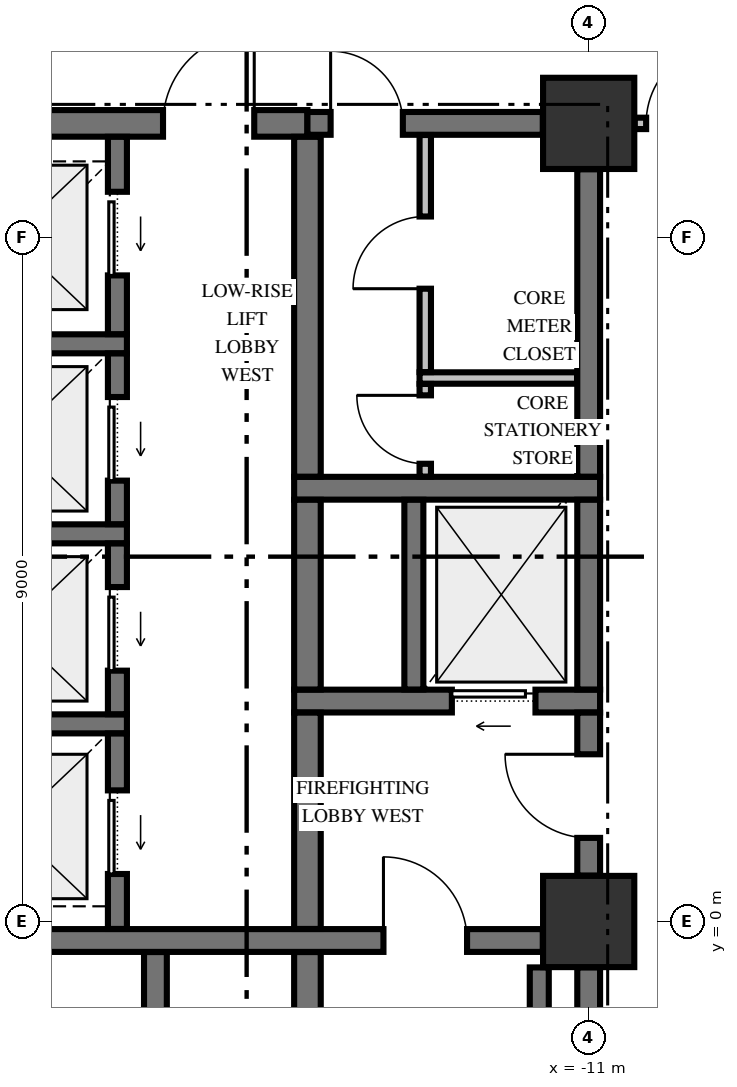
"""IFC4 building model, lengths in metres.
Left out: names, types, materials, properties, quantities, classifications, styles, units other than length and angle.
Written with IfcOpenShell. Run it as: python <this file> out.ifc"""

import sys

from ifc_helpers import new_model, si_unit, direction, frame, frame_2d, origin, origin_2d, place, context, subcontext, project, spatial, rectangle, extrude, element, fill, save


model = new_model("IFC4")
c1 = context("Model", 3, precision=1e-05, world=origin(), true_north=direction((0.0, 1.0)))
c2 = subcontext(c1, "Body", "Model", "MODEL_VIEW")
j1 = project(units=[si_unit("LENGTHUNIT", "METRE"), si_unit("PLANEANGLEUNIT", "RADIAN")], contexts=[c1])
p1 = place(None, origin())
s1 = spatial("IfcSite", under=j1, at=p1, CompositionType="ELEMENT")
p2 = place(p1, origin())
s2 = spatial("IfcBuilding", under=s1, at=p2, CompositionType="ELEMENT")
p3 = place(p2, frame((0.0, 0.0, 27.2)))
s3 = spatial("IfcBuildingStorey", under=s2, at=p3, CompositionType="ELEMENT", Elevation=27.2)
for number, where, z_axis, x_axis in (
    (1, (-11.0, 0.0, -0.45), (0.0, 0.0, 1.0), (1.0, 0.0, 0.0)),
    (2, (-11.0, 10.5, -0.45), (0.0, 0.0, 1.0), (1.0, 0.0, 0.0)),
):
    element("IfcColumn", number, at=place(p3, frame(where, z_axis=z_axis, x_axis=x_axis)), inside=s3, PredefinedType="COLUMN", context=c2, shape_type="SweptSolid", body=[
        extrude(rectangle(XDim=1.2, YDim=1.2, at=origin_2d()), origin(), (0.0, 0.0, 1.0), 3.77),
    ])
p4 = place(p3, frame((-19.396, -0.25, 0.0), z_axis=(0.0, 0.0, 1.0), x_axis=(1.0, 0.0, 0.0)))
e3 = element("IfcWall", 3, at=p4, inside=s3, PredefinedType="SHEAR", context=c2, shape_type="SweptSolid", body=[
    extrude(rectangle(XDim=7.792, YDim=0.3, at=frame_2d((3.896, 0.0))), origin(), (0.0, 0.0, 1.0), 3.32),
])
p5 = place(p4, frame((5.696, 0.0, 0.0)))
e4 = element("IfcOpeningElement", 4, at=p5, cuts=e3, PredefinedType="OPENING", context=c2, shape_type="SweptSolid", body=[
    extrude(rectangle(XDim=1.1, YDim=2.15, at=frame_2d((0.55, 1.075))), frame((0.0, 0.16, 0.0), z_axis=(0.0, -1.0, 0.0), x_axis=(1.0, 0.0, 0.0)), (0.0, 0.0, 1.0), 0.32),
])
p6 = place(p3, frame((-20.175, 2.6, 0.0), z_axis=(0.0, 0.0, 1.0), x_axis=(1.0, 0.0, 0.0)))
e5 = element("IfcWall", 5, at=p6, inside=s3, PredefinedType="SOLIDWALL", context=c2, shape_type="SweptSolid", body=[
    extrude(rectangle(XDim=3.1, YDim=0.25, at=frame_2d((1.55, 0.0))), origin(), (0.0, 0.0, 1.0), 3.32),
])
p7 = place(p3, frame((-14.875, 2.9, 0.0), z_axis=(0.0, 0.0, 1.0), x_axis=(1.0, 0.0, 0.0)))
e6 = element("IfcWall", 6, at=p7, inside=s3, PredefinedType="SHEAR", context=c2, shape_type="SweptSolid", body=[
    extrude(rectangle(XDim=4.025, YDim=0.3, at=frame_2d((2.012, 0.0))), origin(), (0.0, 0.0, 1.0), 3.32),
])
p8 = place(p7, frame((2.075, 0.0, 0.0)))
e7 = element("IfcOpeningElement", 7, at=p8, cuts=e6, PredefinedType="OPENING", context=c2, shape_type="SweptSolid", body=[
    extrude(rectangle(XDim=1.1, YDim=2.2, at=frame_2d((0.55, 1.1))), frame((0.0, 0.16, 0.0), z_axis=(0.0, -1.0, 0.0), x_axis=(1.0, 0.0, 0.0)), (0.0, 0.0, 1.0), 0.32),
])
p9 = place(p3, frame((-20.175, 5.1, 0.0), z_axis=(0.0, 0.0, 1.0), x_axis=(1.0, 0.0, 0.0)))
e8 = element("IfcWall", 8, at=p9, inside=s3, PredefinedType="SOLIDWALL", context=c2, shape_type="SweptSolid", body=[
    extrude(rectangle(XDim=3.1, YDim=0.25, at=frame_2d((1.55, 0.0))), origin(), (0.0, 0.0, 1.0), 3.32),
])
p10 = place(p3, frame((-14.875, 5.7, 0.0), z_axis=(0.0, 0.0, 1.0), x_axis=(1.0, 0.0, 0.0)))
e9 = element("IfcWall", 9, at=p10, inside=s3, PredefinedType="SHEAR", context=c2, shape_type="SweptSolid", body=[
    extrude(rectangle(XDim=4.025, YDim=0.3, at=frame_2d((2.012, 0.0))), origin(), (0.0, 0.0, 1.0), 3.32),
])
p11 = place(p3, frame((-20.175, 7.6, 0.0), z_axis=(0.0, 0.0, 1.0), x_axis=(1.0, 0.0, 0.0)))
e10 = element("IfcWall", 10, at=p11, inside=s3, PredefinedType="SOLIDWALL", context=c2, shape_type="SweptSolid", body=[
    extrude(rectangle(XDim=3.1, YDim=0.25, at=frame_2d((1.55, 0.0))), origin(), (0.0, 0.0, 1.0), 3.32),
])
p12 = place(p3, frame((-19.396, 10.5, 0.0), z_axis=(0.0, 0.0, 1.0), x_axis=(1.0, 0.0, 0.0)))
e11 = element("IfcWall", 11, at=p12, inside=s3, PredefinedType="SHEAR", context=c2, shape_type="SweptSolid", body=[
    extrude(rectangle(XDim=4.696, YDim=0.35, at=frame_2d((2.348, 0.0))), origin(), (0.0, 0.0, 1.0), 3.32),
])
p13 = place(p12, frame((2.796, 0.0, 0.0)))
e12 = element("IfcOpeningElement", 12, at=p13, cuts=e11, PredefinedType="OPENING", context=c2, shape_type="SweptSolid", body=[
    extrude(rectangle(XDim=1.2, YDim=2.15, at=frame_2d((0.6, 1.075))), frame((0.0, 0.185, 0.0), z_axis=(0.0, -1.0, 0.0), x_axis=(1.0, 0.0, 0.0)), (0.0, 0.0, 1.0), 0.37),
])
p14 = place(p3, frame((-14.7, 10.5, 0.0), z_axis=(0.0, 0.0, 1.0), x_axis=(1.0, 0.0, 0.0)))
e13 = element("IfcWall", 13, at=p14, inside=s3, PredefinedType="SHEAR", context=c2, shape_type="SweptSolid", body=[
    extrude(rectangle(XDim=3.096, YDim=0.3, at=frame_2d((1.548, 0.0))), origin(), (0.0, 0.0, 1.0), 3.32),
])
p15 = place(p14, frame((0.305, 0.0, 0.0)))
e14 = element("IfcOpeningElement", 14, at=p15, cuts=e13, PredefinedType="OPENING", context=c2, shape_type="SweptSolid", body=[
    extrude(rectangle(XDim=0.95, YDim=2.15, at=frame_2d((0.475, 1.075))), frame((0.0, 0.16, 0.0), z_axis=(0.0, -1.0, 0.0), x_axis=(1.0, 0.0, 0.0)), (0.0, 0.0, 1.0), 0.32),
])
p16 = place(p3, frame((-13.225, 7.15, 0.0), z_axis=(0.0, 0.0, 1.0), x_axis=(1.0, 0.0, 0.0)))
e15 = element("IfcWall", 15, at=p16, inside=s3, PredefinedType="PARTITIONING", context=c2, shape_type="SweptSolid", body=[
    extrude(rectangle(XDim=2.072, YDim=0.15, at=frame_2d((1.036, 0.0))), origin(), (0.0, 0.0, 1.0), 3.32),
])
p17 = place(p3, frame((-10.394, 10.5, 0.0), z_axis=(0.0, 0.0, 1.0), x_axis=(1.0, 0.0, 0.0)))
e16 = element("IfcWall", 16, at=p17, inside=s3, PredefinedType="PARTITIONING", context=c2, shape_type="SweptSolid", body=[
    extrude(rectangle(XDim=20.788, YDim=0.15, at=frame_2d((10.394, 0.0))), origin(), (0.0, 0.0, 1.0), 3.32),
])
p18 = place(p17, frame((0.15, 0.0, 0.0)))
e17 = element("IfcOpeningElement", 17, at=p18, cuts=e16, PredefinedType="OPENING", context=c2, shape_type="SweptSolid", body=[
    extrude(rectangle(XDim=1.05, YDim=2.15, at=frame_2d((0.525, 1.075))), frame((0.0, 0.085, 0.0), z_axis=(0.0, -1.0, 0.0), x_axis=(1.0, 0.0, 0.0)), (0.0, 0.0, 1.0), 0.17),
])
p19 = place(p17, frame((19.588, 0.0, 0.0)))
e18 = element("IfcOpeningElement", 18, at=p19, cuts=e16, PredefinedType="OPENING", context=c2, shape_type="SweptSolid", body=[
    extrude(rectangle(XDim=1.05, YDim=2.15, at=frame_2d((0.525, 1.075))), frame((0.0, 0.085, 0.0), z_axis=(0.0, -1.0, 0.0), x_axis=(1.0, 0.0, 0.0)), (0.0, 0.0, 1.0), 0.17),
])
p20 = place(p3, frame((-17.2, -0.098, 0.0), z_axis=(0.0, 0.0, 1.0), x_axis=(0.0, 1.0, 0.0)))
e19 = element("IfcWall", 19, at=p20, inside=s3, PredefinedType="SOLIDWALL", context=c2, shape_type="SweptSolid", body=[
    extrude(rectangle(XDim=2.571, YDim=0.25, at=frame_2d((1.285, 0.0))), origin(), (0.0, 0.0, 1.0), 3.32),
])
p21 = place(p20, frame((0.723, 0.0, 0.0)))
e20 = element("IfcOpeningElement", 20, at=p21, cuts=e19, PredefinedType="OPENING", context=c2, shape_type="SweptSolid", body=[
    extrude(rectangle(XDim=1.1, YDim=2.2, at=frame_2d((0.55, 1.1))), frame((0.0, 0.135, 0.0), z_axis=(0.0, -1.0, 0.0), x_axis=(1.0, 0.0, 0.0)), (0.0, 0.0, 1.0), 0.27),
])
p22 = place(p3, frame((-17.2, 2.727, 0.0), z_axis=(0.0, 0.0, 1.0), x_axis=(0.0, 1.0, 0.0)))
e21 = element("IfcWall", 21, at=p22, inside=s3, PredefinedType="SOLIDWALL", context=c2, shape_type="SweptSolid", body=[
    extrude(rectangle(XDim=2.246, YDim=0.25, at=frame_2d((1.123, 0.0))), origin(), (0.0, 0.0, 1.0), 3.32),
])
p23 = place(p22, frame((0.573, 0.0, 0.0)))
e22 = element("IfcOpeningElement", 22, at=p23, cuts=e21, PredefinedType="OPENING", context=c2, shape_type="SweptSolid", body=[
    extrude(rectangle(XDim=1.1, YDim=2.2, at=frame_2d((0.55, 1.1))), frame((0.0, 0.135, 0.0), z_axis=(0.0, -1.0, 0.0), x_axis=(1.0, 0.0, 0.0)), (0.0, 0.0, 1.0), 0.27),
])
p24 = place(p3, frame((-17.2, 5.227, 0.0), z_axis=(0.0, 0.0, 1.0), x_axis=(0.0, 1.0, 0.0)))
e23 = element("IfcWall", 23, at=p24, inside=s3, PredefinedType="SOLIDWALL", context=c2, shape_type="SweptSolid", body=[
    extrude(rectangle(XDim=2.246, YDim=0.25, at=frame_2d((1.123, 0.0))), origin(), (0.0, 0.0, 1.0), 3.32),
])
p25 = place(p24, frame((0.573, 0.0, 0.0)))
e24 = element("IfcOpeningElement", 24, at=p25, cuts=e23, PredefinedType="OPENING", context=c2, shape_type="SweptSolid", body=[
    extrude(rectangle(XDim=1.1, YDim=2.2, at=frame_2d((0.55, 1.1))), frame((0.0, 0.135, 0.0), z_axis=(0.0, -1.0, 0.0), x_axis=(1.0, 0.0, 0.0)), (0.0, 0.0, 1.0), 0.27),
])
p26 = place(p3, frame((-17.2, 7.727, 0.0), z_axis=(0.0, 0.0, 1.0), x_axis=(0.0, 1.0, 0.0)))
e25 = element("IfcWall", 25, at=p26, inside=s3, PredefinedType="SOLIDWALL", context=c2, shape_type="SweptSolid", body=[
    extrude(rectangle(XDim=2.596, YDim=0.25, at=frame_2d((1.298, 0.0))), origin(), (0.0, 0.0, 1.0), 3.32),
])
p27 = place(p26, frame((0.773, 0.0, 0.0)))
e26 = element("IfcOpeningElement", 26, at=p27, cuts=e25, PredefinedType="OPENING", context=c2, shape_type="SweptSolid", body=[
    extrude(rectangle(XDim=1.1, YDim=2.2, at=frame_2d((0.55, 1.1))), frame((0.0, 0.135, 0.0), z_axis=(0.0, -1.0, 0.0), x_axis=(1.0, 0.0, 0.0)), (0.0, 0.0, 1.0), 0.27),
])
p28 = place(p3, frame((-16.7, -9.773, 0.0), z_axis=(0.0, 0.0, 1.0), x_axis=(0.0, 1.0, 0.0)))
e27 = element("IfcWall", 27, at=p28, inside=s3, PredefinedType="SHEAR", context=c2, shape_type="SweptSolid", body=[
    extrude(rectangle(XDim=9.371, YDim=0.3, at=frame_2d((4.686, 0.0))), origin(), (0.0, 0.0, 1.0), 3.32),
])
p29 = place(p3, frame((-14.7, -9.773, 0.0), z_axis=(0.0, 0.0, 1.0), x_axis=(0.0, 1.0, 0.0)))
e28 = element("IfcWall", 28, at=p29, inside=s3, PredefinedType="SHEAR", context=c2, shape_type="SweptSolid", body=[
    extrude(rectangle(XDim=9.371, YDim=0.35, at=frame_2d((4.686, 0.0))), origin(), (0.0, 0.0, 1.0), 3.32),
])
p30 = place(p3, frame((-14.7, -0.098, 0.0), z_axis=(0.0, 0.0, 1.0), x_axis=(0.0, 1.0, 0.0)))
e29 = element("IfcWall", 29, at=p30, inside=s3, PredefinedType="SHEAR", context=c2, shape_type="SweptSolid", body=[
    extrude(rectangle(XDim=2.846, YDim=0.35, at=frame_2d((1.423, 0.0))), origin(), (0.0, 0.0, 1.0), 3.32),
])
p31 = place(p3, frame((-14.7, 3.052, 0.0), z_axis=(0.0, 0.0, 1.0), x_axis=(0.0, 1.0, 0.0)))
e30 = element("IfcWall", 30, at=p31, inside=s3, PredefinedType="SHEAR", context=c2, shape_type="SweptSolid", body=[
    extrude(rectangle(XDim=2.496, YDim=0.35, at=frame_2d((1.248, 0.0))), origin(), (0.0, 0.0, 1.0), 3.32),
])
p32 = place(p3, frame((-14.7, 5.852, 0.0), z_axis=(0.0, 0.0, 1.0), x_axis=(0.0, 1.0, 0.0)))
e31 = element("IfcWall", 31, at=p32, inside=s3, PredefinedType="SHEAR", context=c2, shape_type="SweptSolid", body=[
    extrude(rectangle(XDim=4.471, YDim=0.35, at=frame_2d((2.235, 0.0))), origin(), (0.0, 0.0, 1.0), 3.32),
])
p33 = place(p3, frame((-13.3, 3.052, 0.0), z_axis=(0.0, 0.0, 1.0), x_axis=(0.0, 1.0, 0.0)))
e32 = element("IfcWall", 32, at=p33, inside=s3, PredefinedType="SOLIDWALL", context=c2, shape_type="SweptSolid", body=[
    extrude(rectangle(XDim=2.496, YDim=0.25, at=frame_2d((1.248, 0.0))), origin(), (0.0, 0.0, 1.0), 3.32),
])
p34 = place(p3, frame((-11.65, -9.346, 0.0), z_axis=(0.0, 0.0, 1.0), x_axis=(0.0, 1.0, 0.0)))
e33 = element("IfcWall", 33, at=p34, inside=s3, PredefinedType="SOLIDWALL", context=c2, shape_type="SweptSolid", body=[
    extrude(rectangle(XDim=8.742, YDim=0.25, at=frame_2d((4.371, 0.0))), origin(), (0.0, 0.0, 1.0), 3.32),
])
p35 = place(p3, frame((-11.0, -9.346, 0.0), z_axis=(0.0, 0.0, 1.0), x_axis=(0.0, 1.0, 0.0)))
e34 = element("IfcWall", 34, at=p35, inside=s3, PredefinedType="SHEAR", context=c2, shape_type="SweptSolid", body=[
    extrude(rectangle(XDim=8.742, YDim=0.3, at=frame_2d((4.371, 0.0))), origin(), (0.0, 0.0, 1.0), 3.32),
])
p36 = place(p3, frame((-11.0, 0.604, 0.0), z_axis=(0.0, 0.0, 1.0), x_axis=(0.0, 1.0, 0.0)))
e35 = element("IfcWall", 35, at=p36, inside=s3, PredefinedType="SHEAR", context=c2, shape_type="SweptSolid", body=[
    extrude(rectangle(XDim=2.144, YDim=0.3, at=frame_2d((1.072, 0.0))), origin(), (0.0, 0.0, 1.0), 3.32),
])
p37 = place(p36, frame((0.496, 0.0, 0.0)))
e36 = element("IfcOpeningElement", 36, at=p37, cuts=e35, PredefinedType="OPENING", context=c2, shape_type="SweptSolid", body=[
    extrude(rectangle(XDim=1.1, YDim=2.15, at=frame_2d((0.55, 1.075))), frame((0.0, 0.16, 0.0), z_axis=(0.0, -1.0, 0.0), x_axis=(1.0, 0.0, 0.0)), (0.0, 0.0, 1.0), 0.32),
])
p38 = place(p3, frame((-11.0, 3.052, 0.0), z_axis=(0.0, 0.0, 1.0), x_axis=(0.0, 1.0, 0.0)))
e37 = element("IfcWall", 37, at=p38, inside=s3, PredefinedType="SHEAR", context=c2, shape_type="SweptSolid", body=[
    extrude(rectangle(XDim=2.496, YDim=0.3, at=frame_2d((1.248, 0.0))), origin(), (0.0, 0.0, 1.0), 3.32),
])
p39 = place(p3, frame((-11.0, 5.852, 0.0), z_axis=(0.0, 0.0, 1.0), x_axis=(0.0, 1.0, 0.0)))
e38 = element("IfcWall", 38, at=p39, inside=s3, PredefinedType="SHEAR", context=c2, shape_type="SweptSolid", body=[
    extrude(rectangle(XDim=4.044, YDim=0.3, at=frame_2d((2.022, 0.0))), origin(), (0.0, 0.0, 1.0), 3.32),
])
p40 = place(p3, frame((-13.15, 5.853, 0.0), z_axis=(0.0, 0.0, 1.0), x_axis=(0.0, 1.0, 0.0)))
e39 = element("IfcWall", 39, at=p40, inside=s3, PredefinedType="PARTITIONING", context=c2, shape_type="SweptSolid", body=[
    extrude(rectangle(XDim=1.219, YDim=0.15, at=frame_2d((0.609, 0.0))), origin(), (0.0, 0.0, 1.0), 3.32),
])
p41 = place(p40, frame((0.169, 0.0, 0.0)))
e40 = element("IfcOpeningElement", 40, at=p41, cuts=e39, PredefinedType="OPENING", context=c2, shape_type="SweptSolid", body=[
    extrude(rectangle(XDim=0.9, YDim=2.15, at=frame_2d((0.45, 1.075))), frame((0.0, 0.085, 0.0), z_axis=(0.0, -1.0, 0.0), x_axis=(1.0, 0.0, 0.0)), (0.0, 0.0, 1.0), 0.17),
])
p42 = place(p3, frame((-13.15, 7.228, 0.0), z_axis=(0.0, 0.0, 1.0), x_axis=(0.0, 1.0, 0.0)))
e41 = element("IfcWall", 41, at=p42, inside=s3, PredefinedType="PARTITIONING", context=c2, shape_type="SweptSolid", body=[
    extrude(rectangle(XDim=3.119, YDim=0.15, at=frame_2d((1.56, 0.0))), origin(), (0.0, 0.0, 1.0), 3.32),
])
p43 = place(p42, frame((1.097, 0.0, 0.0)))
e42 = element("IfcOpeningElement", 42, at=p43, cuts=e41, PredefinedType="OPENING", context=c2, shape_type="SweptSolid", body=[
    extrude(rectangle(XDim=0.95, YDim=2.15, at=frame_2d((0.475, 1.075))), frame((0.0, 0.085, 0.0), z_axis=(0.0, -1.0, 0.0), x_axis=(1.0, 0.0, 0.0)), (0.0, 0.0, 1.0), 0.17),
])
p44 = place(p5, origin())
e43 = element("IfcDoor", 43, at=p44, inside=s3, OperationType="SINGLE_SWING_LEFT", PredefinedType="DOOR", context=c2, shape_type="SweptSolid", body=[
    extrude(rectangle(XDim=1.1, YDim=2.15, at=frame_2d((0.55, 1.075))), frame((0.0, 0.025, 0.0), z_axis=(0.0, -1.0, 0.0), x_axis=(1.0, 0.0, 0.0)), (0.0, 0.0, 1.0), 0.05),
])
fill(e4, e43)
p45 = place(p37, origin())
e44 = element("IfcDoor", 44, at=p45, inside=s3, OperationType="SINGLE_SWING_RIGHT", PredefinedType="DOOR", context=c2, shape_type="SweptSolid", body=[
    extrude(rectangle(XDim=1.1, YDim=2.15, at=frame_2d((0.55, 1.075))), frame((0.0, 0.025, 0.0), z_axis=(0.0, -1.0, 0.0), x_axis=(1.0, 0.0, 0.0)), (0.0, 0.0, 1.0), 0.05),
])
fill(e36, e44)
p46 = place(p8, origin())
e45 = element("IfcDoor", 45, at=p46, inside=s3, OperationType="SLIDING_TO_LEFT", PredefinedType="DOOR", context=c2, shape_type="SweptSolid", body=[
    extrude(rectangle(XDim=1.1, YDim=2.2, at=frame_2d((0.55, 1.1))), frame((0.0, 0.025, 0.0), z_axis=(0.0, -1.0, 0.0), x_axis=(1.0, 0.0, 0.0)), (0.0, 0.0, 1.0), 0.05),
])
fill(e7, e45)
p47 = place(p15, origin())
e46 = element("IfcDoor", 46, at=p47, inside=s3, OperationType="SINGLE_SWING_LEFT", PredefinedType="DOOR", context=c2, shape_type="SweptSolid", body=[
    extrude(rectangle(XDim=0.95, YDim=2.15, at=frame_2d((0.475, 1.075))), frame((0.0, 0.025, 0.0), z_axis=(0.0, -1.0, 0.0), x_axis=(1.0, 0.0, 0.0)), (0.0, 0.0, 1.0), 0.05),
])
fill(e14, e46)
p48 = place(p41, origin())
e47 = element("IfcDoor", 47, at=p48, inside=s3, OperationType="SINGLE_SWING_RIGHT", PredefinedType="DOOR", context=c2, shape_type="SweptSolid", body=[
    extrude(rectangle(XDim=0.9, YDim=2.15, at=frame_2d((0.45, 1.075))), frame((0.0, 0.025, 0.0), z_axis=(0.0, -1.0, 0.0), x_axis=(1.0, 0.0, 0.0)), (0.0, 0.0, 1.0), 0.05),
])
fill(e40, e47)
p49 = place(p43, origin())
e48 = element("IfcDoor", 48, at=p49, inside=s3, OperationType="SINGLE_SWING_LEFT", PredefinedType="DOOR", context=c2, shape_type="SweptSolid", body=[
    extrude(rectangle(XDim=0.95, YDim=2.15, at=frame_2d((0.475, 1.075))), frame((0.0, 0.025, 0.0), z_axis=(0.0, -1.0, 0.0), x_axis=(1.0, 0.0, 0.0)), (0.0, 0.0, 1.0), 0.05),
])
fill(e42, e48)
p50 = place(p13, origin())
e49 = element("IfcDoor", 49, at=p50, inside=s3, OperationType="SINGLE_SWING_RIGHT", PredefinedType="DOOR", context=c2, shape_type="SweptSolid", body=[
    extrude(rectangle(XDim=1.2, YDim=2.15, at=frame_2d((0.6, 1.075))), frame((0.0, 0.025, 0.0), z_axis=(0.0, -1.0, 0.0), x_axis=(1.0, 0.0, 0.0)), (0.0, 0.0, 1.0), 0.05),
])
fill(e12, e49)
p51 = place(p21, origin())
e50 = element("IfcDoor", 50, at=p51, inside=s3, OperationType="SLIDING_TO_LEFT", PredefinedType="DOOR", context=c2, shape_type="SweptSolid", body=[
    extrude(rectangle(XDim=1.1, YDim=2.2, at=frame_2d((0.55, 1.1))), frame((0.0, 0.025, 0.0), z_axis=(0.0, -1.0, 0.0), x_axis=(1.0, 0.0, 0.0)), (0.0, 0.0, 1.0), 0.05),
])
fill(e20, e50)
p52 = place(p23, origin())
e51 = element("IfcDoor", 51, at=p52, inside=s3, OperationType="SLIDING_TO_LEFT", PredefinedType="DOOR", context=c2, shape_type="SweptSolid", body=[
    extrude(rectangle(XDim=1.1, YDim=2.2, at=frame_2d((0.55, 1.1))), frame((0.0, 0.025, 0.0), z_axis=(0.0, -1.0, 0.0), x_axis=(1.0, 0.0, 0.0)), (0.0, 0.0, 1.0), 0.05),
])
fill(e22, e51)
p53 = place(p25, origin())
e52 = element("IfcDoor", 52, at=p53, inside=s3, OperationType="SLIDING_TO_LEFT", PredefinedType="DOOR", context=c2, shape_type="SweptSolid", body=[
    extrude(rectangle(XDim=1.1, YDim=2.2, at=frame_2d((0.55, 1.1))), frame((0.0, 0.025, 0.0), z_axis=(0.0, -1.0, 0.0), x_axis=(1.0, 0.0, 0.0)), (0.0, 0.0, 1.0), 0.05),
])
fill(e24, e52)
p54 = place(p27, origin())
e53 = element("IfcDoor", 53, at=p54, inside=s3, OperationType="SLIDING_TO_LEFT", PredefinedType="DOOR", context=c2, shape_type="SweptSolid", body=[
    extrude(rectangle(XDim=1.1, YDim=2.2, at=frame_2d((0.55, 1.1))), frame((0.0, 0.025, 0.0), z_axis=(0.0, -1.0, 0.0), x_axis=(1.0, 0.0, 0.0)), (0.0, 0.0, 1.0), 0.05),
])
fill(e26, e53)
p55 = place(p18, origin())
e54 = element("IfcDoor", 54, at=p55, inside=s3, OperationType="SINGLE_SWING_RIGHT", PredefinedType="DOOR", context=c2, shape_type="SweptSolid", body=[
    extrude(rectangle(XDim=1.05, YDim=2.15, at=frame_2d((0.525, 1.075))), frame((0.0, 0.025, 0.0), z_axis=(0.0, -1.0, 0.0), x_axis=(1.0, 0.0, 0.0)), (0.0, 0.0, 1.0), 0.05),
])
fill(e17, e54)
save(model, sys.argv[1])
